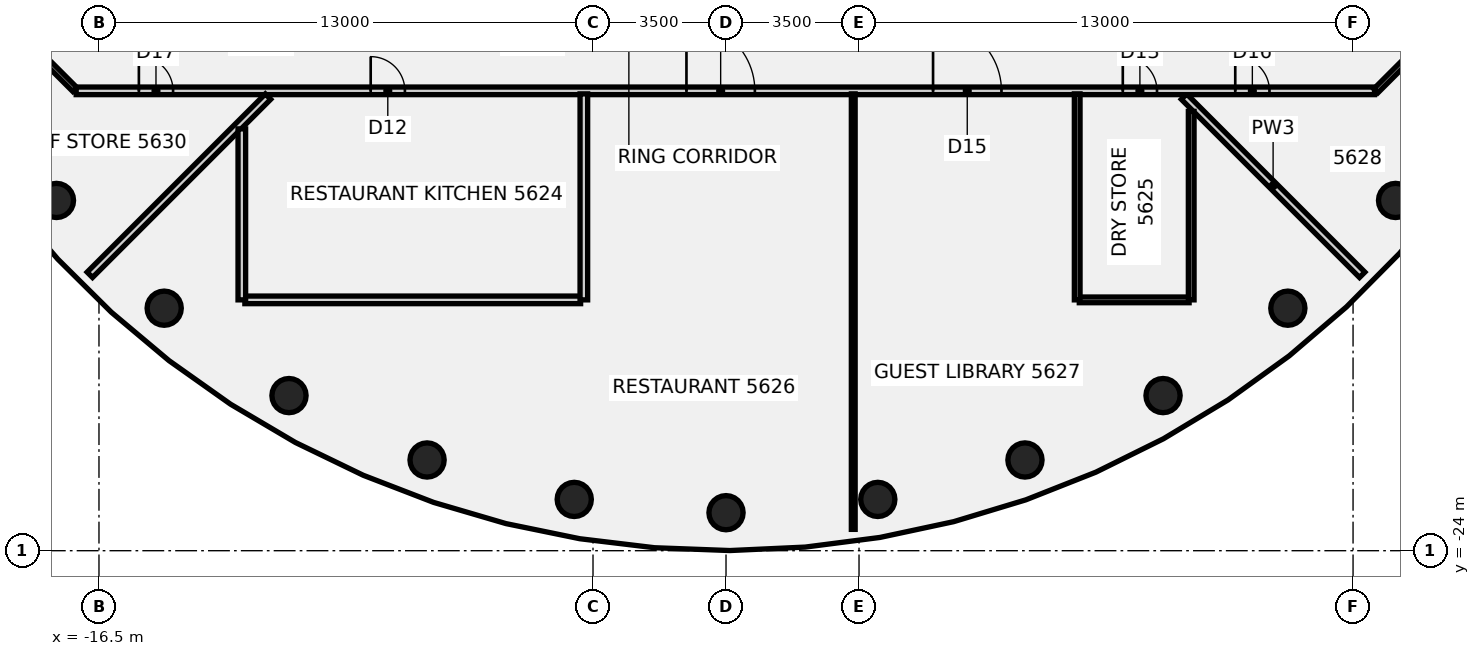
"""IFC4 building model, lengths in metres.
Left out: names, types, materials, properties, quantities, classifications, styles, units other than length and angle.
Written with IfcOpenShell. Run it as: python <this file> out.ifc"""

import sys

from ifc_helpers import new_model, si_unit, direction, frame, frame_2d, origin, origin_2d, place, context, subcontext, project, spatial, rectangle, circle, extrude, element, fill, save


model = new_model("IFC4")
c1 = context("Model", 3, precision=1e-05, world=origin(), true_north=direction((0.0, 1.0)))
c2 = subcontext(c1, "Body", "Model", "MODEL_VIEW")
j1 = project(units=[si_unit("LENGTHUNIT", "METRE"), si_unit("PLANEANGLEUNIT", "RADIAN")], contexts=[c1])
p1 = place(None, origin())
s1 = spatial("IfcSite", under=j1, at=p1, CompositionType="ELEMENT")
p2 = place(p1, origin())
s2 = spatial("IfcBuilding", under=s1, at=p2, CompositionType="ELEMENT")
p3 = place(p2, frame((0.0, 0.0, 223.5)))
s3 = spatial("IfcBuildingStorey", under=s2, at=p3, CompositionType="ELEMENT", Elevation=223.5)
for number, where, z_axis, x_axis in (
    (1, (-17.619, -14.784, -0.14), (0.0, 0.0, 1.0), (1.0, 0.0, 0.0)),
    (2, (-14.784, -17.619, -0.14), (0.0, 0.0, 1.0), (1.0, 0.0, 0.0)),
    (3, (-11.5, -19.919, -0.14), (0.0, 0.0, 1.0), (1.0, 0.0, 0.0)),
    (4, (-7.866, -21.613, -0.14), (0.0, 0.0, 1.0), (1.0, 0.0, 0.0)),
    (5, (-3.994, -22.651, -0.14), (0.0, 0.0, 1.0), (1.0, 0.0, 0.0)),
    (6, (0.0, -23.0, -0.14), (0.0, 0.0, 1.0), (1.0, 0.0, 0.0)),
    (7, (3.994, -22.651, -0.14), (0.0, 0.0, 1.0), (1.0, 0.0, 0.0)),
    (8, (7.866, -21.613, -0.14), (0.0, 0.0, 1.0), (1.0, 0.0, 0.0)),
    (9, (11.5, -19.919, -0.14), (0.0, 0.0, 1.0), (1.0, 0.0, 0.0)),
    (10, (14.784, -17.619, -0.14), (0.0, 0.0, 1.0), (1.0, 0.0, 0.0)),
    (11, (17.619, -14.784, -0.14), (0.0, 0.0, 1.0), (1.0, 0.0, 0.0)),
):
    element("IfcColumn", number, at=place(p3, frame(where, z_axis=z_axis, x_axis=x_axis)), inside=s3, PredefinedType="COLUMN", context=c2, shape_type="SweptSolid", body=[
        extrude(circle(Radius=0.45, at=origin_2d()), origin(), (0.0, 0.0, 1.0), 3.6),
    ])
p4 = place(p3, frame((-18.872, -10.128, 0.0), z_axis=(0.0, 0.0, 1.0), x_axis=(0.707106781187, -0.707106781187, 0.0)))
e12 = element("IfcWall", 12, at=p4, inside=s3, PredefinedType="PARTITIONING", context=c2, shape_type="SweptSolid", body=[
    extrude(rectangle(XDim=2.455, YDim=0.15, at=frame_2d((1.228, 0.0))), origin(), (0.0, 0.0, 1.0), 2.864),
])
p5 = place(p3, frame((12.052, -12.052, 0.0), z_axis=(0.0, 0.0, 1.0), x_axis=(0.707106781187, -0.707106781187, 0.0)))
e13 = element("IfcWall", 13, at=p5, inside=s3, PredefinedType="PARTITIONING", context=c2, shape_type="SweptSolid", body=[
    extrude(rectangle(XDim=6.631, YDim=0.2, at=frame_2d((3.315, 0.0))), origin(), (0.0, 0.0, 1.0), 2.864),
])
p6 = place(p3, frame((-17.1, -11.9, 0.0), z_axis=(0.0, 0.0, 1.0), x_axis=(1.0, 0.0, 0.0)))
e14 = element("IfcWall", 14, at=p6, inside=s3, PredefinedType="PARTITIONING", context=c2, shape_type="SweptSolid", body=[
    extrude(rectangle(XDim=34.165, YDim=0.2, at=frame_2d((17.083, 0.0))), origin(), (0.0, 0.0, 1.0), 2.864),
])
p7 = place(p6, frame((7.75, 0.0, 0.0)))
e15 = element("IfcOpeningElement", 15, at=p7, cuts=e14, PredefinedType="OPENING", context=c2, shape_type="SweptSolid", body=[
    extrude(rectangle(XDim=0.9, YDim=2.1, at=frame_2d((0.45, 1.05))), frame((0.0, 0.11, 0.0), z_axis=(0.0, -1.0, 0.0), x_axis=(1.0, 0.0, 0.0)), (0.0, 0.0, 1.0), 0.22),
])
p8 = place(p6, frame((27.541, 0.0, 0.0)))
e16 = element("IfcOpeningElement", 16, at=p8, cuts=e14, PredefinedType="OPENING", context=c2, shape_type="SweptSolid", body=[
    extrude(rectangle(XDim=0.9, YDim=2.1, at=frame_2d((0.45, 1.05))), frame((0.0, 0.11, 0.0), z_axis=(0.0, -1.0, 0.0), x_axis=(1.0, 0.0, 0.0)), (0.0, 0.0, 1.0), 0.22),
])
p9 = place(p6, frame((16.059, 0.0, 0.0)))
e17 = element("IfcOpeningElement", 17, at=p9, cuts=e14, PredefinedType="OPENING", context=c2, shape_type="SweptSolid", body=[
    extrude(rectangle(XDim=1.8, YDim=2.1, at=frame_2d((0.9, 1.05))), frame((0.0, 0.11, 0.0), z_axis=(0.0, -1.0, 0.0), x_axis=(1.0, 0.0, 0.0)), (0.0, 0.0, 1.0), 0.22),
])
p10 = place(p6, frame((22.548, 0.0, 0.0)))
e18 = element("IfcOpeningElement", 18, at=p10, cuts=e14, PredefinedType="OPENING", context=c2, shape_type="SweptSolid", body=[
    extrude(rectangle(XDim=1.8, YDim=2.1, at=frame_2d((0.9, 1.05))), frame((0.0, 0.11, 0.0), z_axis=(0.0, -1.0, 0.0), x_axis=(1.0, 0.0, 0.0)), (0.0, 0.0, 1.0), 0.22),
])
p11 = place(p6, frame((30.5, 0.0, 0.0)))
e19 = element("IfcOpeningElement", 19, at=p11, cuts=e14, PredefinedType="OPENING", context=c2, shape_type="SweptSolid", body=[
    extrude(rectangle(XDim=0.9, YDim=2.1, at=frame_2d((0.45, 1.05))), frame((0.0, 0.11, 0.0), z_axis=(0.0, -1.0, 0.0), x_axis=(1.0, 0.0, 0.0)), (0.0, 0.0, 1.0), 0.22),
])
p12 = place(p6, frame((1.65, 0.0, 0.0)))
e20 = element("IfcOpeningElement", 20, at=p12, cuts=e14, PredefinedType="OPENING", context=c2, shape_type="SweptSolid", body=[
    extrude(rectangle(XDim=0.9, YDim=2.1, at=frame_2d((0.45, 1.05))), frame((0.0, 0.11, 0.0), z_axis=(0.0, -1.0, 0.0), x_axis=(1.0, 0.0, 0.0)), (0.0, 0.0, 1.0), 0.22),
])
p13 = place(p3, frame((-12.661, -17.4, 0.0), z_axis=(0.0, 0.0, 1.0), x_axis=(1.0, 0.0, 0.0)))
e21 = element("IfcWall", 21, at=p13, inside=s3, PredefinedType="PARTITIONING", context=c2, shape_type="SweptSolid", body=[
    extrude(rectangle(XDim=8.835, YDim=0.2, at=frame_2d((4.417, 0.0))), origin(), (0.0, 0.0, 1.0), 2.864),
])
p14 = place(p3, frame((9.296, -17.4, 0.0), z_axis=(0.0, 0.0, 1.0), x_axis=(1.0, 0.0, 0.0)))
e22 = element("IfcWall", 22, at=p14, inside=s3, PredefinedType="PARTITIONING", context=c2, shape_type="SweptSolid", body=[
    extrude(rectangle(XDim=2.89, YDim=0.15, at=frame_2d((1.445, 0.0))), origin(), (0.0, 0.0, 1.0), 2.864),
])
p15 = place(p3, frame((-16.74, -16.74, 0.0), z_axis=(0.0, 0.0, 1.0), x_axis=(0.707106781187, 0.707106781187, 0.0)))
e23 = element("IfcWall", 23, at=p15, inside=s3, PredefinedType="PARTITIONING", context=c2, shape_type="SweptSolid", body=[
    extrude(rectangle(XDim=6.631, YDim=0.2, at=frame_2d((3.315, 0.0))), origin(), (0.0, 0.0, 1.0), 2.864),
])
p16 = place(p3, frame((17.1, -11.9, 0.0), z_axis=(0.0, 0.0, 1.0), x_axis=(0.707106781187, 0.707106781187, 0.0)))
e24 = element("IfcWall", 24, at=p16, inside=s3, PredefinedType="PARTITIONING", context=c2, shape_type="SweptSolid", body=[
    extrude(rectangle(XDim=2.505, YDim=0.15, at=frame_2d((1.253, 0.0))), origin(), (0.0, 0.0, 1.0), 2.864),
])
p17 = place(p3, frame((-12.741, -17.4, 0.0), z_axis=(0.0, 0.0, 1.0), x_axis=(0.0, 1.0, 0.0)))
e25 = element("IfcWall", 25, at=p17, inside=s3, PredefinedType="PARTITIONING", context=c2, shape_type="SweptSolid", body=[
    extrude(rectangle(XDim=4.499, YDim=0.2, at=frame_2d((2.25, 0.0))), origin(), (0.0, 0.0, 1.0), 2.864),
])
p18 = place(p3, frame((-3.741, -17.4, 0.0), z_axis=(0.0, 0.0, 1.0), x_axis=(0.0, 1.0, 0.0)))
e26 = element("IfcWall", 26, at=p18, inside=s3, PredefinedType="PARTITIONING", context=c2, shape_type="SweptSolid", body=[
    extrude(rectangle(XDim=5.42, YDim=0.2, at=frame_2d((2.71, 0.0))), origin(), (0.0, 0.0, 1.0), 2.864),
])
p19 = place(p3, frame((3.348, -23.439, 0.0), z_axis=(0.0, 0.0, 1.0), x_axis=(0.0, 1.0, 0.0)))
e27 = element("IfcWall", 27, at=p19, inside=s3, PredefinedType="PARTITIONING", context=c2, shape_type="SweptSolid", body=[
    extrude(rectangle(XDim=11.459, YDim=0.1, at=frame_2d((5.729, 0.0))), origin(), (0.0, 0.0, 1.0), 2.864),
])
p20 = place(p3, frame((9.241, -17.4, 0.0), z_axis=(0.0, 0.0, 1.0), x_axis=(0.0, 1.0, 0.0)))
e28 = element("IfcWall", 28, at=p20, inside=s3, PredefinedType="PARTITIONING", context=c2, shape_type="SweptSolid", body=[
    extrude(rectangle(XDim=5.42, YDim=0.15, at=frame_2d((2.71, 0.0))), origin(), (0.0, 0.0, 1.0), 2.864),
])
p21 = place(p3, frame((12.241, -17.4, 0.0), z_axis=(0.0, 0.0, 1.0), x_axis=(0.0, 1.0, 0.0)))
e29 = element("IfcWall", 29, at=p21, inside=s3, PredefinedType="PARTITIONING", context=c2, shape_type="SweptSolid", body=[
    extrude(rectangle(XDim=4.959, YDim=0.15, at=frame_2d((2.479, 0.0))), origin(), (0.0, 0.0, 1.0), 2.864),
])
p22 = place(p7, frame((0.9, 0.0, 0.0), z_axis=(0.0, 0.0, 1.0), x_axis=(-1.0, 0.0, 0.0)))
e30 = element("IfcDoor", 30, at=p22, inside=s3, OperationType="SINGLE_SWING_LEFT", PredefinedType="DOOR", context=c2, shape_type="SweptSolid", body=[
    extrude(rectangle(XDim=0.9, YDim=2.1, at=frame_2d((0.45, 1.05))), frame((0.0, 0.025, 0.0), z_axis=(0.0, -1.0, 0.0), x_axis=(1.0, 0.0, 0.0)), (0.0, 0.0, 1.0), 0.05),
])
fill(e15, e30)
p23 = place(p8, frame((0.9, 0.0, 0.0), z_axis=(0.0, 0.0, 1.0), x_axis=(-1.0, 0.0, 0.0)))
e31 = element("IfcDoor", 31, at=p23, inside=s3, OperationType="SINGLE_SWING_RIGHT", PredefinedType="DOOR", context=c2, shape_type="SweptSolid", body=[
    extrude(rectangle(XDim=0.9, YDim=2.1, at=frame_2d((0.45, 1.05))), frame((0.0, 0.025, 0.0), z_axis=(0.0, -1.0, 0.0), x_axis=(1.0, 0.0, 0.0)), (0.0, 0.0, 1.0), 0.05),
])
fill(e16, e31)
p24 = place(p9, origin())
e32 = element("IfcDoor", 32, at=p24, inside=s3, OperationType="DOUBLE_DOOR_SINGLE_SWING", PredefinedType="DOOR", context=c2, shape_type="SweptSolid", body=[
    extrude(rectangle(XDim=1.8, YDim=2.1, at=frame_2d((0.9, 1.05))), frame((0.0, 0.025, 0.0), z_axis=(0.0, -1.0, 0.0), x_axis=(1.0, 0.0, 0.0)), (0.0, 0.0, 1.0), 0.05),
])
fill(e17, e32)
p25 = place(p10, frame((1.8, 0.0, 0.0), z_axis=(0.0, 0.0, 1.0), x_axis=(-1.0, 0.0, 0.0)))
e33 = element("IfcDoor", 33, at=p25, inside=s3, OperationType="DOUBLE_DOOR_SINGLE_SWING", PredefinedType="DOOR", context=c2, shape_type="SweptSolid", body=[
    extrude(rectangle(XDim=1.8, YDim=2.1, at=frame_2d((0.9, 1.05))), frame((0.0, 0.025, 0.0), z_axis=(0.0, -1.0, 0.0), x_axis=(1.0, 0.0, 0.0)), (0.0, 0.0, 1.0), 0.05),
])
fill(e18, e33)
p26 = place(p11, frame((0.9, 0.0, 0.0), z_axis=(0.0, 0.0, 1.0), x_axis=(-1.0, 0.0, 0.0)))
e34 = element("IfcDoor", 34, at=p26, inside=s3, OperationType="SINGLE_SWING_RIGHT", PredefinedType="DOOR", context=c2, shape_type="SweptSolid", body=[
    extrude(rectangle(XDim=0.9, YDim=2.1, at=frame_2d((0.45, 1.05))), frame((0.0, 0.025, 0.0), z_axis=(0.0, -1.0, 0.0), x_axis=(1.0, 0.0, 0.0)), (0.0, 0.0, 1.0), 0.05),
])
fill(e19, e34)
p27 = place(p12, frame((0.9, 0.0, 0.0), z_axis=(0.0, 0.0, 1.0), x_axis=(-1.0, 0.0, 0.0)))
e35 = element("IfcDoor", 35, at=p27, inside=s3, OperationType="SINGLE_SWING_LEFT", PredefinedType="DOOR", context=c2, shape_type="SweptSolid", body=[
    extrude(rectangle(XDim=0.9, YDim=2.1, at=frame_2d((0.45, 1.05))), frame((0.0, 0.025, 0.0), z_axis=(0.0, -1.0, 0.0), x_axis=(1.0, 0.0, 0.0)), (0.0, 0.0, 1.0), 0.05),
])
fill(e20, e35)
save(model, sys.argv[1])
